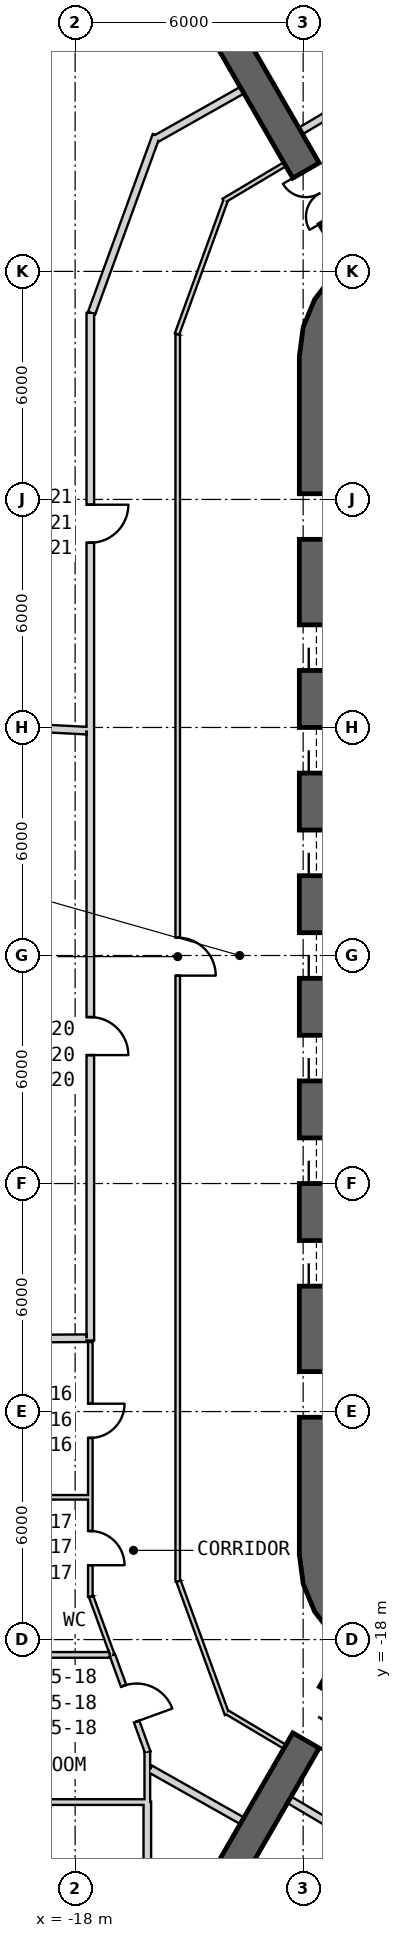
"""IFC4 building model, lengths in metres.
Left out: names, types, materials, properties, quantities, classifications, styles, units other than length and angle.
Written with IfcOpenShell. Run it as: python <this file> out.ifc"""

import sys

from ifc_helpers import new_model, si_unit, direction, frame, frame_2d, origin, place, context, subcontext, project, spatial, polyline, rectangle, outline, extrude, element, fill, save


model = new_model("IFC4")
c1 = context("Model", 3, precision=1e-05, world=origin(), true_north=direction((0.0, 1.0)))
c2 = subcontext(c1, "Body", "Model", "MODEL_VIEW")
j1 = project(units=[si_unit("LENGTHUNIT", "METRE"), si_unit("PLANEANGLEUNIT", "RADIAN")], contexts=[c1])
p1 = place(None, origin())
s1 = spatial("IfcSite", under=j1, at=p1, CompositionType="ELEMENT")
p2 = place(p1, origin())
s2 = spatial("IfcBuilding", under=s1, at=p2, CompositionType="ELEMENT")
p3 = place(p2, frame((0.0, 0.0, 107.0)))
s3 = spatial("IfcBuildingStorey", under=s2, at=p3, CompositionType="ELEMENT", Elevation=107.0)
p4 = place(p3, frame((-11.65, 15.762, 0.0), z_axis=(0.0, 0.0, 1.0), x_axis=(0.0, -1.0, 0.0)))
e1 = element("IfcWall", 1, at=p4, inside=s3, PredefinedType="SHEAR", context=c2, shape_type="SweptSolid", body=[
    extrude(rectangle(XDim=31.523, YDim=0.9, at=frame_2d((15.762, 0.0))), origin(), (0.0, 0.0, 1.0), 4.1),
])
p5 = place(p4, frame((7.062, 0.0, 0.0)))
e2 = element("IfcOpeningElement", 2, at=p5, cuts=e1, PredefinedType="OPENING", context=c2, shape_type="SweptSolid", body=[
    extrude(rectangle(XDim=1.2, YDim=2.4, at=frame_2d((0.6, 1.2))), frame((0.0, 0.46, 0.0), z_axis=(0.0, -1.0, 0.0), x_axis=(1.0, 0.0, 0.0)), (0.0, 0.0, 1.0), 0.92),
])
p6 = place(p4, frame((9.762, 0.0, 0.0)))
e3 = element("IfcOpeningElement", 3, at=p6, cuts=e1, PredefinedType="OPENING", context=c2, shape_type="SweptSolid", body=[
    extrude(rectangle(XDim=1.2, YDim=2.4, at=frame_2d((0.6, 1.2))), frame((0.0, 0.46, 0.0), z_axis=(0.0, -1.0, 0.0), x_axis=(1.0, 0.0, 0.0)), (0.0, 0.0, 1.0), 0.92),
])
p7 = place(p4, frame((12.462, 0.0, 0.0)))
e4 = element("IfcOpeningElement", 4, at=p7, cuts=e1, PredefinedType="OPENING", context=c2, shape_type="SweptSolid", body=[
    extrude(rectangle(XDim=1.2, YDim=2.4, at=frame_2d((0.6, 1.2))), frame((0.0, 0.46, 0.0), z_axis=(0.0, -1.0, 0.0), x_axis=(1.0, 0.0, 0.0)), (0.0, 0.0, 1.0), 0.92),
])
p8 = place(p4, frame((15.162, 0.0, 0.0)))
e5 = element("IfcOpeningElement", 5, at=p8, cuts=e1, PredefinedType="OPENING", context=c2, shape_type="SweptSolid", body=[
    extrude(rectangle(XDim=1.2, YDim=2.4, at=frame_2d((0.6, 1.2))), frame((0.0, 0.46, 0.0), z_axis=(0.0, -1.0, 0.0), x_axis=(1.0, 0.0, 0.0)), (0.0, 0.0, 1.0), 0.92),
])
p9 = place(p4, frame((17.862, 0.0, 0.0)))
e6 = element("IfcOpeningElement", 6, at=p9, cuts=e1, PredefinedType="OPENING", context=c2, shape_type="SweptSolid", body=[
    extrude(rectangle(XDim=1.2, YDim=2.4, at=frame_2d((0.6, 1.2))), frame((0.0, 0.46, 0.0), z_axis=(0.0, -1.0, 0.0), x_axis=(1.0, 0.0, 0.0)), (0.0, 0.0, 1.0), 0.92),
])
p10 = place(p4, frame((20.562, 0.0, 0.0)))
e7 = element("IfcOpeningElement", 7, at=p10, cuts=e1, PredefinedType="OPENING", context=c2, shape_type="SweptSolid", body=[
    extrude(rectangle(XDim=1.2, YDim=2.4, at=frame_2d((0.6, 1.2))), frame((0.0, 0.46, 0.0), z_axis=(0.0, -1.0, 0.0), x_axis=(1.0, 0.0, 0.0)), (0.0, 0.0, 1.0), 0.92),
])
p11 = place(p4, frame((23.262, 0.0, 0.0)))
e8 = element("IfcOpeningElement", 8, at=p11, cuts=e1, PredefinedType="OPENING", context=c2, shape_type="SweptSolid", body=[
    extrude(rectangle(XDim=1.2, YDim=2.4, at=frame_2d((0.6, 1.2))), frame((0.0, 0.46, 0.0), z_axis=(0.0, -1.0, 0.0), x_axis=(1.0, 0.0, 0.0)), (0.0, 0.0, 1.0), 0.92),
])
p12 = place(p4, frame((3.612, 0.0, 0.0)))
e9 = element("IfcOpeningElement", 9, at=p12, cuts=e1, PredefinedType="OPENING", context=c2, shape_type="SweptSolid", body=[
    extrude(rectangle(XDim=1.2, YDim=2.4, at=frame_2d((0.6, 1.2))), frame((0.0, 0.46, 0.0), z_axis=(0.0, -1.0, 0.0), x_axis=(1.0, 0.0, 0.0)), (0.0, 0.0, 1.0), 0.92),
])
p13 = place(p4, frame((26.712, 0.0, 0.0)))
e10 = element("IfcOpeningElement", 10, at=p13, cuts=e1, PredefinedType="OPENING", context=c2, shape_type="SweptSolid", body=[
    extrude(rectangle(XDim=1.2, YDim=2.4, at=frame_2d((0.6, 1.2))), frame((0.0, 0.46, 0.0), z_axis=(0.0, -1.0, 0.0), x_axis=(1.0, 0.0, 0.0)), (0.0, 0.0, 1.0), 0.92),
])
p14 = place(p3, origin())
e11 = element("IfcWall", 11, at=p14, inside=s3, PredefinedType="SHEAR", context=c2, shape_type="SweptSolid", body=[
    extrude(outline(polyline([(-7.6, 18.36), (-8.323, 18.659), (-9.1, 18.762), (-9.876, 18.659), (-10.6, 18.36), (-11.221, 17.883), (-11.698, 17.262), (-11.998, 16.538), (-12.1, 15.762), (-11.2, 15.762), (-11.128, 16.305), (-10.919, 16.812), (-10.585, 17.247), (-10.15, 17.58), (-9.644, 17.79), (-9.1, 17.862), (-8.556, 17.79), (-8.05, 17.58), (-7.6, 18.36)])), origin(), (0.0, 0.0, 1.0), 4.1),
])
p15 = place(p3, origin())
e12 = element("IfcWall", 12, at=p15, inside=s3, PredefinedType="SHEAR", context=c2, shape_type="SweptSolid", body=[
    extrude(outline(polyline([(-12.1, -15.762), (-11.998, -16.538), (-11.698, -17.262), (-11.221, -17.883), (-10.6, -18.36), (-9.876, -18.659), (-9.1, -18.762), (-8.323, -18.659), (-7.6, -18.36), (-8.05, -17.58), (-8.556, -17.79), (-9.1, -17.862), (-9.644, -17.79), (-10.15, -17.58), (-10.585, -17.247), (-10.919, -16.812), (-11.128, -16.305), (-11.2, -15.762), (-12.1, -15.762)])), origin(), (0.0, 0.0, 1.0), 4.1),
])
p16 = place(p3, frame((-10.575, 18.316, 0.0), z_axis=(0.0, 0.0, 1.0), x_axis=(-0.500003112169, 0.866023606965, 0.0)))
e13 = element("IfcWall", 13, at=p16, inside=s3, PredefinedType="SHEAR", context=c2, shape_type="SweptSolid", body=[
    extrude(rectangle(XDim=13.027, YDim=0.8, at=frame_2d((6.513, 0.0))), origin(), (0.0, 0.0, 1.0), 4.1),
])
p17 = place(p16, frame((1.3, 0.0, 0.0)))
e14 = element("IfcOpeningElement", 14, at=p17, cuts=e13, PredefinedType="OPENING", context=c2, shape_type="SweptSolid", body=[
    extrude(rectangle(XDim=1.4, YDim=2.4, at=frame_2d((0.7, 1.2))), frame((0.0, 0.41, 0.0), z_axis=(0.0, -1.0, 0.0), x_axis=(1.0, 0.0, 0.0)), (0.0, 0.0, 1.0), 0.82),
])
p18 = place(p3, frame((-10.575, -18.316, 0.0), z_axis=(0.0, 0.0, 1.0), x_axis=(-0.500003112169, -0.866023606965, 0.0)))
e15 = element("IfcWall", 15, at=p18, inside=s3, PredefinedType="SHEAR", context=c2, shape_type="SweptSolid", body=[
    extrude(rectangle(XDim=13.027, YDim=0.8, at=frame_2d((6.513, 0.0))), origin(), (0.0, 0.0, 1.0), 4.1),
])
p19 = place(p18, frame((1.3, 0.0, 0.0)))
e16 = element("IfcOpeningElement", 16, at=p19, cuts=e15, PredefinedType="OPENING", context=c2, shape_type="SweptSolid", body=[
    extrude(rectangle(XDim=1.4, YDim=2.4, at=frame_2d((0.7, 1.2))), frame((0.0, 0.41, 0.0), z_axis=(0.0, -1.0, 0.0), x_axis=(1.0, 0.0, 0.0)), (0.0, 0.0, 1.0), 0.82),
])
p20 = place(p3, frame((-12.482, 20.819, 0.0), z_axis=(0.0, 0.0, 1.0), x_axis=(-0.85913200524, -0.511754040113, 0.0)))
e17 = element("IfcWall", 17, at=p20, inside=s3, PredefinedType="PARTITIONING", context=c2, shape_type="SweptSolid", body=[
    extrude(rectangle(XDim=1.875, YDim=0.12, at=frame_2d((0.937, 0.0))), origin(), (0.0, 0.0, 1.0), 3.8),
])
p21 = place(p3, frame((-14.038, 19.872, 0.0), z_axis=(0.0, 0.0, 1.0), x_axis=(-0.342035870777, -0.939686896313, 0.0)))
e18 = element("IfcWall", 18, at=p21, inside=s3, PredefinedType="PARTITIONING", context=c2, shape_type="SweptSolid", body=[
    extrude(rectangle(XDim=3.749, YDim=0.12, at=frame_2d((1.875, 0.0))), origin(), (0.0, 0.0, 1.0), 2.88),
])
p22 = place(p3, frame((-15.3, 16.345, 0.0), z_axis=(0.0, 0.0, 1.0), x_axis=(0.0, -1.0, 0.0)))
e19 = element("IfcWall", 19, at=p22, inside=s3, PredefinedType="PARTITIONING", context=c2, shape_type="SweptSolid", body=[
    extrude(rectangle(XDim=32.811, YDim=0.12, at=frame_2d((16.405, 0.0))), origin(), (0.0, 0.0, 1.0), 2.98),
])
p23 = place(p22, frame((15.875, 0.0, 0.0)))
e20 = element("IfcOpeningElement", 20, at=p23, cuts=e19, PredefinedType="OPENING", context=c2, shape_type="SweptSolid", body=[
    extrude(rectangle(XDim=1.0, YDim=2.1, at=frame_2d((0.5, 1.05))), frame((0.0, 0.07, 0.0), z_axis=(0.0, -1.0, 0.0), x_axis=(1.0, 0.0, 0.0)), (0.0, 0.0, 1.0), 0.14),
])
p24 = place(p3, frame((-15.28, -16.462, 0.0), z_axis=(0.0, 0.0, 1.0), x_axis=(0.34206888523, -0.939674878752, 0.0)))
e21 = element("IfcWall", 21, at=p24, inside=s3, PredefinedType="PARTITIONING", context=c2, shape_type="SweptSolid", body=[
    extrude(rectangle(XDim=3.73, YDim=0.12, at=frame_2d((1.865, 0.0))), origin(), (0.0, 0.0, 1.0), 2.88),
])
p25 = place(p3, frame((-14.005, -19.912, 0.0), z_axis=(0.0, 0.0, 1.0), x_axis=(0.859128591272, -0.511759771435, 0.0)))
e22 = element("IfcWall", 22, at=p25, inside=s3, PredefinedType="PARTITIONING", context=c2, shape_type="SweptSolid", body=[
    extrude(rectangle(XDim=1.773, YDim=0.12, at=frame_2d((0.887, 0.0))), origin(), (0.0, 0.0, 1.0), 3.8),
])
p26 = place(p3, frame((-17.6, 16.911, 0.0), z_axis=(0.0, 0.0, 1.0), x_axis=(0.0, -1.0, 0.0)))
e23 = element("IfcWall", 23, at=p26, inside=s3, PredefinedType="PARTITIONING", context=c2, shape_type="SweptSolid", body=[
    extrude(rectangle(XDim=11.022, YDim=0.2, at=frame_2d((5.511, 0.0))), origin(), (0.0, 0.0, 1.0), 2.98),
])
p27 = place(p26, frame((5.05, 0.0, 0.0)))
e24 = element("IfcOpeningElement", 24, at=p27, cuts=e23, PredefinedType="OPENING", context=c2, shape_type="SweptSolid", body=[
    extrude(rectangle(XDim=1.0, YDim=2.1, at=frame_2d((0.5, 1.05))), frame((0.0, 0.11, 0.0), z_axis=(0.0, -1.0, 0.0), x_axis=(1.0, 0.0, 0.0)), (0.0, 0.0, 1.0), 0.22),
])
p28 = place(p3, frame((-17.6, 5.888, 0.0), z_axis=(0.0, 0.0, 1.0), x_axis=(0.0, -1.0, 0.0)))
e25 = element("IfcWall", 25, at=p28, inside=s3, PredefinedType="PARTITIONING", context=c2, shape_type="SweptSolid", body=[
    extrude(rectangle(XDim=16.018, YDim=0.2, at=frame_2d((8.009, 0.0))), origin(), (0.0, 0.0, 1.0), 3.08),
])
p29 = place(p28, frame((7.509, 0.0, 0.0)))
e26 = element("IfcOpeningElement", 26, at=p29, cuts=e25, PredefinedType="OPENING", context=c2, shape_type="SweptSolid", body=[
    extrude(rectangle(XDim=1.0, YDim=2.1, at=frame_2d((0.5, 1.05))), frame((0.0, 0.11, 0.0), z_axis=(0.0, -1.0, 0.0), x_axis=(1.0, 0.0, 0.0)), (0.0, 0.0, 1.0), 0.22),
])
p30 = place(p3, frame((-16.025, -21.403, 0.0), z_axis=(0.0, 0.0, 1.0), x_axis=(0.870940841338, -0.491387882318, 0.0)))
e27 = element("IfcWall", 27, at=p30, inside=s3, PredefinedType="PARTITIONING", context=c2, shape_type="SweptSolid", body=[
    extrude(rectangle(XDim=2.777, YDim=0.2, at=frame_2d((1.388, 0.0))), origin(), (0.0, 0.0, 1.0), 3.8),
])
p31 = place(p3, frame((-15.864, 21.581, 0.0), z_axis=(0.0, 0.0, 1.0), x_axis=(-0.342030631204, -0.939688803444, 0.0)))
e28 = element("IfcWall", 28, at=p31, inside=s3, PredefinedType="PARTITIONING", context=c2, shape_type="SweptSolid", body=[
    extrude(rectangle(XDim=4.976, YDim=0.2, at=frame_2d((2.488, 0.0))), origin(), (0.0, 0.0, 1.0), 2.88),
])
p32 = place(p3, frame((-13.606, 22.767, 0.0), z_axis=(0.0, 0.0, 1.0), x_axis=(-0.870922595713, -0.491420219645, 0.0)))
e29 = element("IfcWall", 29, at=p32, inside=s3, PredefinedType="PARTITIONING", context=c2, shape_type="SweptSolid", body=[
    extrude(rectangle(XDim=2.589, YDim=0.2, at=frame_2d((1.295, 0.0))), origin(), (0.0, 0.0, 1.0), 3.8),
])
p33 = place(p3, frame((-17.6, -10.17, 0.0), z_axis=(0.0, 0.0, 1.0), x_axis=(0.0, -1.0, 0.0)))
e30 = element("IfcWall", 30, at=p33, inside=s3, PredefinedType="PARTITIONING", context=c2, shape_type="SweptSolid", body=[
    extrude(rectangle(XDim=6.701, YDim=0.12, at=frame_2d((3.351, 0.0))), origin(), (0.0, 0.0, 1.0), 2.98),
])
p34 = place(p33, frame((1.623, 0.0, 0.0)))
e31 = element("IfcOpeningElement", 31, at=p34, cuts=e30, PredefinedType="OPENING", context=c2, shape_type="SweptSolid", body=[
    extrude(rectangle(XDim=0.9, YDim=2.1, at=frame_2d((0.45, 1.05))), frame((0.0, 0.07, 0.0), z_axis=(0.0, -1.0, 0.0), x_axis=(1.0, 0.0, 0.0)), (0.0, 0.0, 1.0), 0.14),
])
p35 = place(p33, frame((4.974, 0.0, 0.0)))
e32 = element("IfcOpeningElement", 32, at=p35, cuts=e30, PredefinedType="OPENING", context=c2, shape_type="SweptSolid", body=[
    extrude(rectangle(XDim=0.9, YDim=2.1, at=frame_2d((0.45, 1.05))), frame((0.0, 0.07, 0.0), z_axis=(0.0, -1.0, 0.0), x_axis=(1.0, 0.0, 0.0)), (0.0, 0.0, 1.0), 0.14),
])
p36 = place(p3, frame((-17.58, -16.867, 0.0), z_axis=(0.0, 0.0, 1.0), x_axis=(0.342113754223, -0.939658543925, 0.0)))
e33 = element("IfcWall", 33, at=p36, inside=s3, PredefinedType="PARTITIONING", context=c2, shape_type="SweptSolid", body=[
    extrude(rectangle(XDim=1.639, YDim=0.12, at=frame_2d((0.82, 0.0))), origin(), (0.0, 0.0, 1.0), 2.98),
])
p37 = place(p3, frame((-17.019, -18.407, 0.0), z_axis=(0.0, 0.0, 1.0), x_axis=(0.341987834354, -0.939704379661, 0.0)))
e34 = element("IfcWall", 34, at=p37, inside=s3, PredefinedType="PLUMBINGWALL", context=c2, shape_type="SweptSolid", body=[
    extrude(rectangle(XDim=2.723, YDim=0.15, at=frame_2d((1.361, 0.0))), origin(), (0.0, 0.0, 1.0), 2.88),
])
p38 = place(p37, frame((0.862, 0.0, 0.0)))
e35 = element("IfcOpeningElement", 35, at=p38, cuts=e34, PredefinedType="OPENING", context=c2, shape_type="SweptSolid", body=[
    extrude(rectangle(XDim=1.0, YDim=2.1, at=frame_2d((0.5, 1.05))), frame((0.0, 0.085, 0.0), z_axis=(0.0, -1.0, 0.0), x_axis=(1.0, 0.0, 0.0)), (0.0, 0.0, 1.0), 0.17),
])
p39 = place(p3, frame((-10.228, 22.786, 0.0), z_axis=(0.0, 0.0, 1.0), x_axis=(-0.859754348804, -0.510707802674, 0.0)))
e36 = element("IfcWall", 36, at=p39, inside=s3, PredefinedType="PARTITIONING", context=c2, shape_type="SweptSolid", body=[
    extrude(rectangle(XDim=2.135, YDim=0.2, at=frame_2d((1.068, 0.0))), origin(), (0.0, 0.0, 1.0), 3.8),
])
p40 = place(p3, frame((-12.364, -22.215, 0.0), z_axis=(0.0, 0.0, 1.0), x_axis=(0.860324145196, -0.509747354278, 0.0)))
e37 = element("IfcWall", 37, at=p40, inside=s3, PredefinedType="PARTITIONING", context=c2, shape_type="SweptSolid", body=[
    extrude(rectangle(XDim=2.189, YDim=0.2, at=frame_2d((1.094, 0.0))), origin(), (0.0, 0.0, 1.0), 3.8),
])
p41 = place(p3, frame((-17.7, 5.916, 0.0), z_axis=(0.0, 0.0, 1.0), x_axis=(-0.998647121722, 0.051999291111, 0.0)))
e38 = element("IfcWall", 38, at=p41, inside=s3, PredefinedType="PARTITIONING", context=c2, shape_type="SweptSolid", body=[
    extrude(rectangle(XDim=11.611, YDim=0.2, at=frame_2d((5.805, 0.0))), origin(), (0.0, 0.0, 1.0), 3.08),
])
p42 = place(p3, frame((-17.7, -10.071, 0.0), z_axis=(0.0, 0.0, 1.0), x_axis=(-0.999980184405, -0.006295299554, 0.0)))
e39 = element("IfcWall", 39, at=p42, inside=s3, PredefinedType="PARTITIONING", context=c2, shape_type="SweptSolid", body=[
    extrude(rectangle(XDim=4.77, YDim=0.2, at=frame_2d((2.385, 0.0))), origin(), (0.0, 0.0, 1.0), 3.8),
])
p43 = place(p3, frame((-16.1, -22.268, 0.0), z_axis=(0.0, 0.0, 1.0), x_axis=(0.0, 1.0, 0.0)))
e40 = element("IfcWall", 40, at=p43, inside=s3, PredefinedType="PLUMBINGWALL", context=c2, shape_type="SweptSolid", body=[
    extrude(rectangle(XDim=1.32, YDim=0.15, at=frame_2d((0.66, 0.0))), origin(), (0.0, 0.0, 1.0), 2.88),
])
p44 = place(p3, frame((-16.1, -26.69, 0.0), z_axis=(0.0, 0.0, 1.0), x_axis=(0.0, 1.0, 0.0)))
e41 = element("IfcWall", 41, at=p44, inside=s3, PredefinedType="PARTITIONING", context=c2, shape_type="SweptSolid", body=[
    extrude(rectangle(XDim=4.422, YDim=0.2, at=frame_2d((2.211, 0.0))), origin(), (0.0, 0.0, 1.0), 3.8),
])
p45 = place(p3, frame((-17.66, -14.256, 0.0), z_axis=(0.0, 0.0, 1.0), x_axis=(-1.0, 0.0, 0.0)))
e42 = element("IfcWall", 42, at=p45, inside=s3, PredefinedType="PARTITIONING", context=c2, shape_type="SweptSolid", body=[
    extrude(rectangle(XDim=4.61, YDim=0.12, at=frame_2d((2.305, 0.0))), origin(), (0.0, 0.0, 1.0), 3.08),
])
p46 = place(p3, frame((-17.084, -18.403, 0.0), z_axis=(0.0, 0.0, 1.0), x_axis=(-1.0, 0.0, 0.0)))
e43 = element("IfcWall", 43, at=p46, inside=s3, PredefinedType="PLUMBINGWALL", context=c2, shape_type="SweptSolid", body=[
    extrude(rectangle(XDim=5.186, YDim=0.15, at=frame_2d((2.593, 0.0))), origin(), (0.0, 0.0, 1.0), 2.98),
])
p47 = place(p3, frame((-16.175, -22.275, 0.0), z_axis=(0.0, 0.0, 1.0), x_axis=(-1.0, 0.0, 0.0)))
e44 = element("IfcWall", 44, at=p47, inside=s3, PredefinedType="PLUMBINGWALL", context=c2, shape_type="SweptSolid", body=[
    extrude(rectangle(XDim=6.12, YDim=0.15, at=frame_2d((3.06, 0.0))), origin(), (0.0, 0.0, 1.0), 2.88),
])
p48 = place(p23, origin())
e45 = element("IfcDoor", 45, at=p48, inside=s3, OperationType="SINGLE_SWING_LEFT", PredefinedType="NOTDEFINED", context=c2, shape_type="SweptSolid", body=[
    extrude(rectangle(XDim=1.0, YDim=2.1, at=frame_2d((0.5, 1.05))), frame((0.0, 0.025, 0.0), z_axis=(0.0, -1.0, 0.0), x_axis=(1.0, 0.0, 0.0)), (0.0, 0.0, 1.0), 0.05),
])
fill(e20, e45)
p49 = place(p34, origin())
e46 = element("IfcDoor", 46, at=p49, inside=s3, OperationType="SINGLE_SWING_RIGHT", PredefinedType="NOTDEFINED", context=c2, shape_type="SweptSolid", body=[
    extrude(rectangle(XDim=0.9, YDim=2.1, at=frame_2d((0.45, 1.05))), frame((0.0, 0.025, 0.0), z_axis=(0.0, -1.0, 0.0), x_axis=(1.0, 0.0, 0.0)), (0.0, 0.0, 1.0), 0.05),
])
fill(e31, e46)
p50 = place(p35, origin())
e47 = element("IfcDoor", 47, at=p50, inside=s3, OperationType="SINGLE_SWING_LEFT", PredefinedType="NOTDEFINED", context=c2, shape_type="SweptSolid", body=[
    extrude(rectangle(XDim=0.9, YDim=2.1, at=frame_2d((0.45, 1.05))), frame((0.0, 0.025, 0.0), z_axis=(0.0, -1.0, 0.0), x_axis=(1.0, 0.0, 0.0)), (0.0, 0.0, 1.0), 0.05),
])
fill(e32, e47)
p51 = place(p38, origin())
e48 = element("IfcDoor", 48, at=p51, inside=s3, OperationType="SINGLE_SWING_LEFT", PredefinedType="USERDEFINED", context=c2, shape_type="SweptSolid", body=[
    extrude(rectangle(XDim=1.0, YDim=2.1, at=frame_2d((0.5, 1.05))), frame((0.0, 0.025, 0.0), z_axis=(0.0, -1.0, 0.0), x_axis=(1.0, 0.0, 0.0)), (0.0, 0.0, 1.0), 0.05),
])
fill(e35, e48)
p52 = place(p29, origin())
e49 = element("IfcDoor", 49, at=p52, inside=s3, OperationType="SINGLE_SWING_RIGHT", PredefinedType="USERDEFINED", context=c2, shape_type="SweptSolid", body=[
    extrude(rectangle(XDim=1.0, YDim=2.1, at=frame_2d((0.5, 1.05))), frame((0.0, 0.025, 0.0), z_axis=(0.0, -1.0, 0.0), x_axis=(1.0, 0.0, 0.0)), (0.0, 0.0, 1.0), 0.05),
])
fill(e26, e49)
p53 = place(p27, origin())
e50 = element("IfcDoor", 50, at=p53, inside=s3, OperationType="SINGLE_SWING_LEFT", PredefinedType="USERDEFINED", context=c2, shape_type="SweptSolid", body=[
    extrude(rectangle(XDim=1.0, YDim=2.1, at=frame_2d((0.5, 1.05))), frame((0.0, 0.025, 0.0), z_axis=(0.0, -1.0, 0.0), x_axis=(1.0, 0.0, 0.0)), (0.0, 0.0, 1.0), 0.05),
])
fill(e24, e50)
p54 = place(p5, origin())
e51 = element("IfcDoor", 51, at=p54, inside=s3, OperationType="SLIDING_TO_LEFT", PredefinedType="USERDEFINED", context=c2, shape_type="SweptSolid", body=[
    extrude(rectangle(XDim=1.2, YDim=2.4, at=frame_2d((0.6, 1.2))), frame((0.0, 0.025, 0.0), z_axis=(0.0, -1.0, 0.0), x_axis=(1.0, 0.0, 0.0)), (0.0, 0.0, 1.0), 0.05),
])
fill(e2, e51)
p55 = place(p6, origin())
e52 = element("IfcDoor", 52, at=p55, inside=s3, OperationType="SLIDING_TO_LEFT", PredefinedType="USERDEFINED", context=c2, shape_type="SweptSolid", body=[
    extrude(rectangle(XDim=1.2, YDim=2.4, at=frame_2d((0.6, 1.2))), frame((0.0, 0.025, 0.0), z_axis=(0.0, -1.0, 0.0), x_axis=(1.0, 0.0, 0.0)), (0.0, 0.0, 1.0), 0.05),
])
fill(e3, e52)
p56 = place(p7, origin())
e53 = element("IfcDoor", 53, at=p56, inside=s3, OperationType="SLIDING_TO_LEFT", PredefinedType="USERDEFINED", context=c2, shape_type="SweptSolid", body=[
    extrude(rectangle(XDim=1.2, YDim=2.4, at=frame_2d((0.6, 1.2))), frame((0.0, 0.025, 0.0), z_axis=(0.0, -1.0, 0.0), x_axis=(1.0, 0.0, 0.0)), (0.0, 0.0, 1.0), 0.05),
])
fill(e4, e53)
p57 = place(p8, origin())
e54 = element("IfcDoor", 54, at=p57, inside=s3, OperationType="SLIDING_TO_LEFT", PredefinedType="USERDEFINED", context=c2, shape_type="SweptSolid", body=[
    extrude(rectangle(XDim=1.2, YDim=2.4, at=frame_2d((0.6, 1.2))), frame((0.0, 0.025, 0.0), z_axis=(0.0, -1.0, 0.0), x_axis=(1.0, 0.0, 0.0)), (0.0, 0.0, 1.0), 0.05),
])
fill(e5, e54)
p58 = place(p9, origin())
e55 = element("IfcDoor", 55, at=p58, inside=s3, OperationType="SLIDING_TO_LEFT", PredefinedType="USERDEFINED", context=c2, shape_type="SweptSolid", body=[
    extrude(rectangle(XDim=1.2, YDim=2.4, at=frame_2d((0.6, 1.2))), frame((0.0, 0.025, 0.0), z_axis=(0.0, -1.0, 0.0), x_axis=(1.0, 0.0, 0.0)), (0.0, 0.0, 1.0), 0.05),
])
fill(e6, e55)
p59 = place(p10, origin())
e56 = element("IfcDoor", 56, at=p59, inside=s3, OperationType="SLIDING_TO_LEFT", PredefinedType="USERDEFINED", context=c2, shape_type="SweptSolid", body=[
    extrude(rectangle(XDim=1.2, YDim=2.4, at=frame_2d((0.6, 1.2))), frame((0.0, 0.025, 0.0), z_axis=(0.0, -1.0, 0.0), x_axis=(1.0, 0.0, 0.0)), (0.0, 0.0, 1.0), 0.05),
])
fill(e7, e56)
p60 = place(p11, origin())
e57 = element("IfcDoor", 57, at=p60, inside=s3, OperationType="SLIDING_TO_LEFT", PredefinedType="USERDEFINED", context=c2, shape_type="SweptSolid", body=[
    extrude(rectangle(XDim=1.2, YDim=2.4, at=frame_2d((0.6, 1.2))), frame((0.0, 0.025, 0.0), z_axis=(0.0, -1.0, 0.0), x_axis=(1.0, 0.0, 0.0)), (0.0, 0.0, 1.0), 0.05),
])
fill(e8, e57)
p61 = place(p12, origin())
e58 = element("IfcDoor", 58, at=p61, inside=s3, OperationType="SINGLE_SWING_LEFT", PredefinedType="USERDEFINED", context=c2, shape_type="SweptSolid", body=[
    extrude(rectangle(XDim=1.2, YDim=2.4, at=frame_2d((0.6, 1.2))), frame((0.0, 0.025, 0.0), z_axis=(0.0, -1.0, 0.0), x_axis=(1.0, 0.0, 0.0)), (0.0, 0.0, 1.0), 0.05),
])
fill(e9, e58)
p62 = place(p13, origin())
e59 = element("IfcDoor", 59, at=p62, inside=s3, OperationType="SINGLE_SWING_LEFT", PredefinedType="USERDEFINED", context=c2, shape_type="SweptSolid", body=[
    extrude(rectangle(XDim=1.2, YDim=2.4, at=frame_2d((0.6, 1.2))), frame((0.0, 0.025, 0.0), z_axis=(0.0, -1.0, 0.0), x_axis=(1.0, 0.0, 0.0)), (0.0, 0.0, 1.0), 0.05),
])
fill(e10, e59)
p63 = place(p17, origin())
e60 = element("IfcDoor", 60, at=p63, inside=s3, OperationType="DOUBLE_DOOR_SINGLE_SWING", PredefinedType="NOTDEFINED", context=c2, shape_type="SweptSolid", body=[
    extrude(rectangle(XDim=1.4, YDim=2.4, at=frame_2d((0.7, 1.2))), frame((0.0, 0.025, 0.0), z_axis=(0.0, -1.0, 0.0), x_axis=(1.0, 0.0, 0.0)), (0.0, 0.0, 1.0), 0.05),
])
fill(e14, e60)
p64 = place(p19, origin())
e61 = element("IfcDoor", 61, at=p64, inside=s3, OperationType="DOUBLE_DOOR_SINGLE_SWING", PredefinedType="NOTDEFINED", context=c2, shape_type="SweptSolid", body=[
    extrude(rectangle(XDim=1.4, YDim=2.4, at=frame_2d((0.7, 1.2))), frame((0.0, 0.025, 0.0), z_axis=(0.0, -1.0, 0.0), x_axis=(1.0, 0.0, 0.0)), (0.0, 0.0, 1.0), 0.05),
])
fill(e16, e61)
save(model, sys.argv[1])
